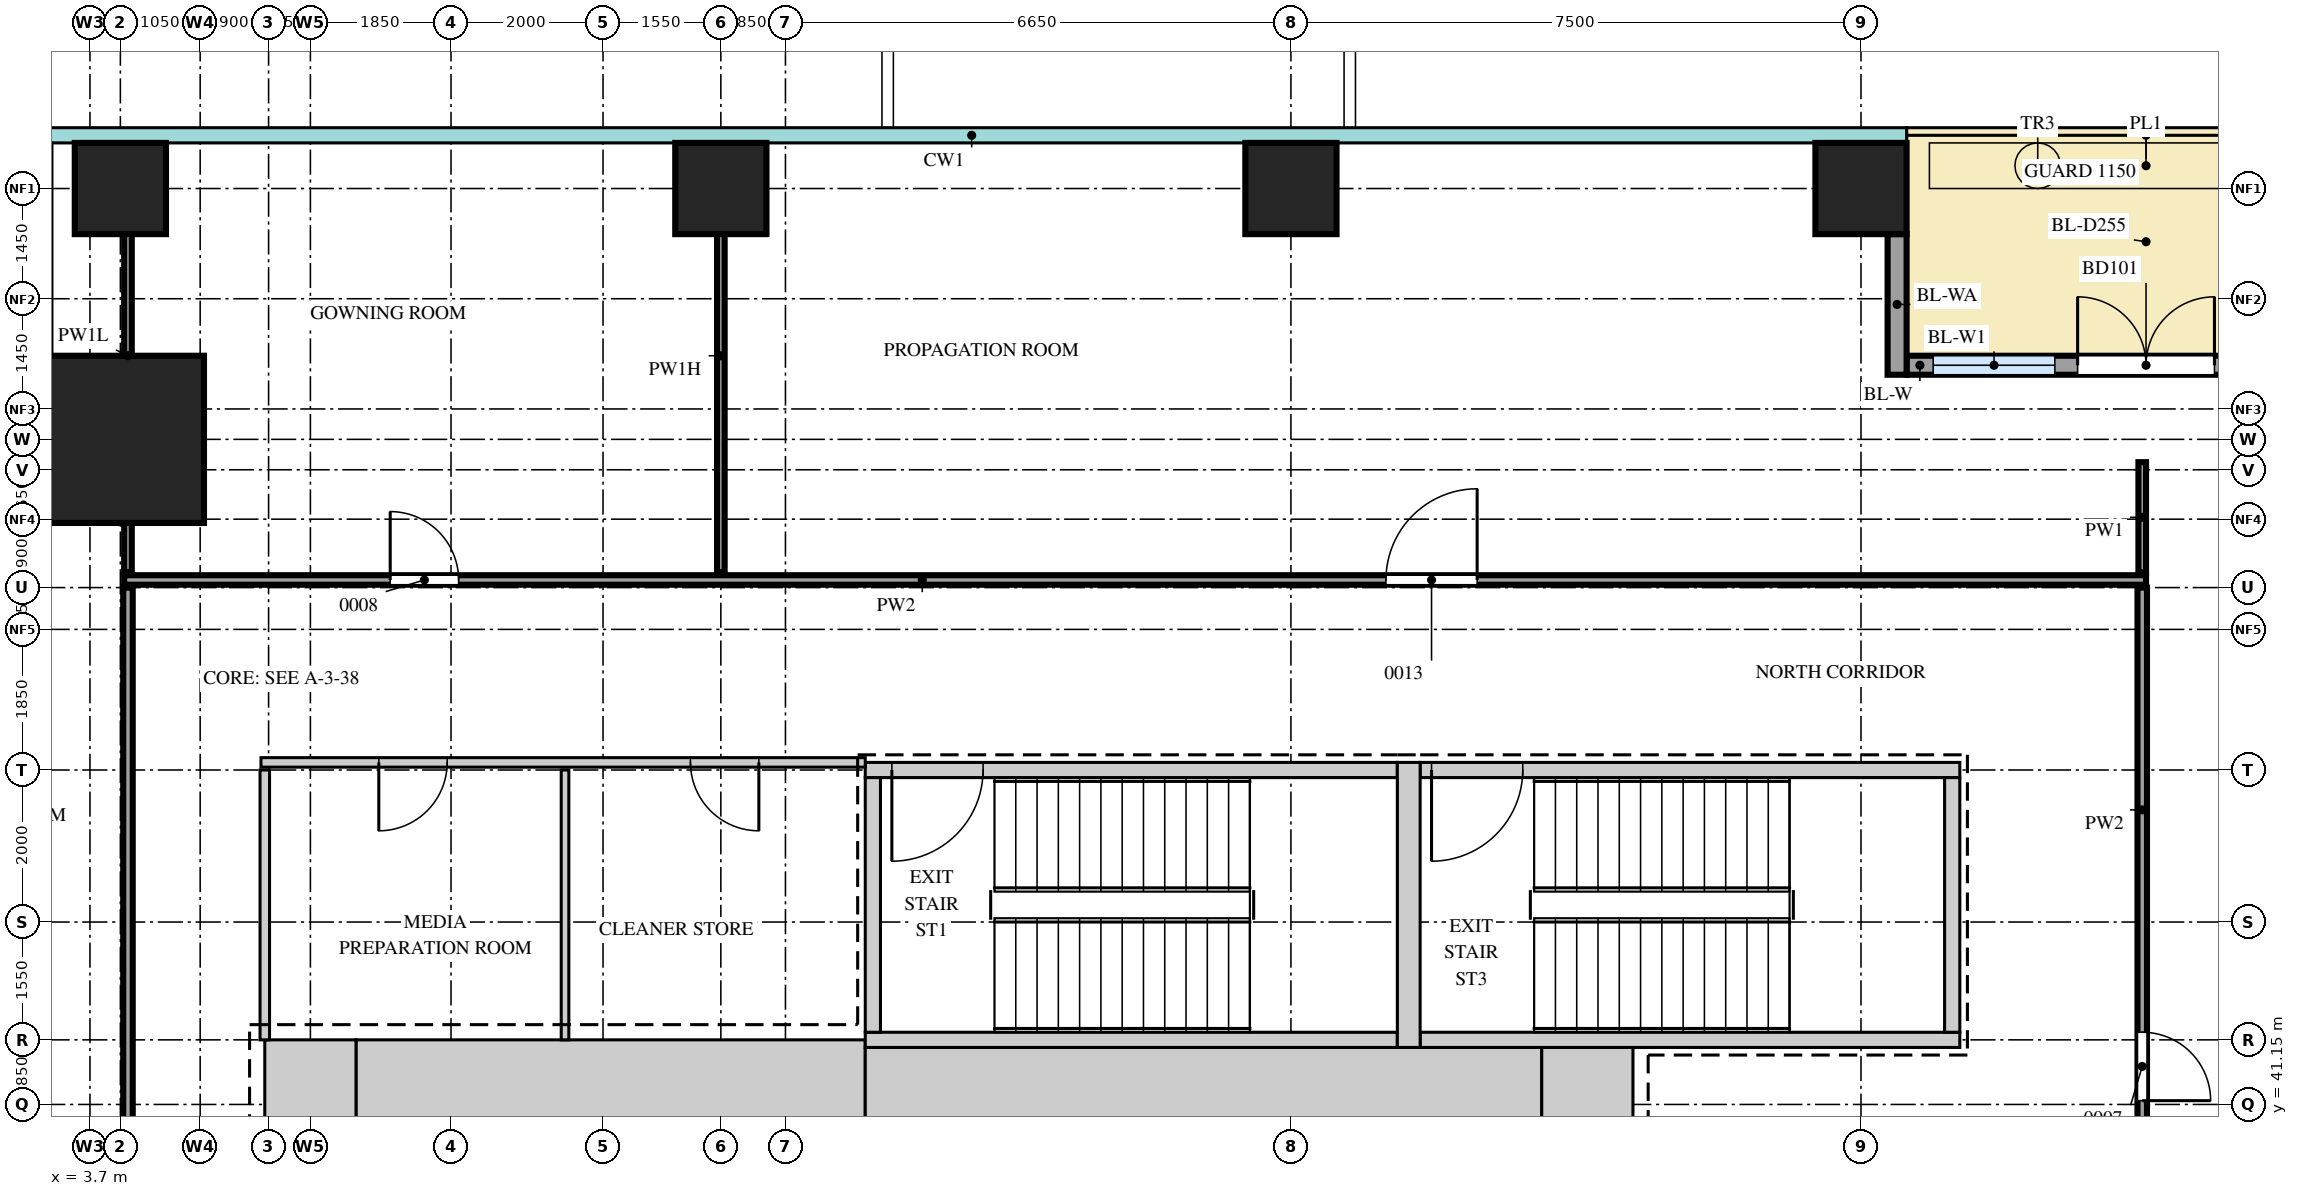
"""IFC4 building model, lengths in metres.
Left out: names, types, materials, properties, quantities, classifications, styles, units other than length and angle.
Written with IfcOpenShell. Run it as: python <this file> out.ifc"""

import sys

from ifc_helpers import new_model, si_unit, direction, frame, frame_2d, origin, origin_2d, place, context, subcontext, project, spatial, rectangle, extrude, source, transform, mapped, element, fill, save


model = new_model("IFC4")
c1 = context("Model", 3, precision=1e-05, world=origin(), true_north=direction((0.0, 1.0)))
c2 = subcontext(c1, "Body", "Model", "MODEL_VIEW")
j1 = project(units=[si_unit("LENGTHUNIT", "METRE"), si_unit("PLANEANGLEUNIT", "RADIAN")], contexts=[c1])
p1 = place(None, origin())
s1 = spatial("IfcSite", under=j1, at=p1, CompositionType="ELEMENT")
p2 = place(p1, origin())
s2 = spatial("IfcBuilding", under=s1, at=p2, CompositionType="ELEMENT")
p3 = place(p2, frame((0.0, 0.0, 51.0)))
s3 = spatial("IfcBuildingStorey", under=s2, at=p3, CompositionType="ELEMENT", Elevation=51.0)
m1 = source(origin(), c2, "Body", "SweptSolid", [
    extrude(rectangle(XDim=6.7, YDim=1.2, at=frame_2d((3.35, 0.0))), origin(), (0.0, 0.0, 1.0), 4.2),
])
p4 = place(p3, frame((7.2, 41.4, 0.0), z_axis=(0.0, 0.0, 1.0), x_axis=(1.0, 0.0, 0.0)))
e1 = element("IfcWall", 1, at=p4, inside=s3, PredefinedType="SHEAR", context=c2, shape_type="MappedRepresentation", body=[
    mapped(m1, transform((0.0, 0.0, 0.0))),
])
m2 = source(origin(), c2, "Body", "SweptSolid", [
    extrude(rectangle(XDim=8.9, YDim=1.1, at=frame_2d((4.45, 0.0))), origin(), (0.0, 0.0, 1.0), 4.2),
])
p5 = place(p3, frame((13.9, 41.35, 0.0), z_axis=(0.0, 0.0, 1.0), x_axis=(1.0, 0.0, 0.0)))
e2 = element("IfcWall", 2, at=p5, inside=s3, PredefinedType="SHEAR", context=c2, shape_type="MappedRepresentation", body=[
    mapped(m2, transform((0.0, 0.0, 0.0))),
])
m3 = source(origin(), c2, "Body", "SweptSolid", [
    extrude(rectangle(XDim=1.2, YDim=1.1, at=frame_2d((0.6, 0.0))), origin(), (0.0, 0.0, 1.0), 4.2),
])
p6 = place(p3, frame((22.8, 41.35, 0.0), z_axis=(0.0, 0.0, 1.0), x_axis=(1.0, 0.0, 0.0)))
e3 = element("IfcWall", 3, at=p6, inside=s3, PredefinedType="SHEAR", context=c2, shape_type="MappedRepresentation", body=[
    mapped(m3, transform((0.0, 0.0, 0.0))),
])
m4 = source(origin(), c2, "Body", "SweptSolid", [
    extrude(rectangle(XDim=1.2, YDim=1.2, at=frame_2d((0.6, 0.0))), origin(), (0.0, 0.0, 1.0), 4.2),
])
p7 = place(p3, frame((6.0, 41.4, 0.0), z_axis=(0.0, 0.0, 1.0), x_axis=(1.0, 0.0, 0.0)))
e4 = element("IfcWall", 4, at=p7, inside=s3, PredefinedType="SHEAR", context=c2, shape_type="MappedRepresentation", body=[
    mapped(m4, transform((0.0, 0.0, 0.0))),
])
m5 = source(origin(), c2, "Body", "SweptSolid", [
    extrude(rectangle(XDim=7.0, YDim=0.2, at=frame_2d((3.5, 0.0))), origin(), (0.0, 0.0, 1.0), 4.2),
])
p8 = place(p3, frame((13.9, 45.55, 0.0), z_axis=(0.0, 0.0, 1.0), x_axis=(1.0, 0.0, 0.0)))
e5 = element("IfcWall", 5, at=p8, inside=s3, PredefinedType="SHEAR", context=c2, shape_type="MappedRepresentation", body=[
    mapped(m5, transform((0.0, 0.0, 0.0))),
])
m6 = source(origin(), c2, "Body", "SweptSolid", [
    extrude(rectangle(XDim=1.2, YDim=2.1, at=frame_2d((0.6, 1.05))), frame((0.0, 0.11, 0.0), z_axis=(0.0, -1.0, 0.0), x_axis=(1.0, 0.0, 0.0)), (0.0, 0.0, 1.0), 0.22),
])
p9 = place(p8, frame((0.35, 0.0, 0.0)))
e6 = element("IfcOpeningElement", 6, at=p9, cuts=e5, PredefinedType="OPENING", context=c2, shape_type="MappedRepresentation", body=[
    mapped(m6, transform((0.0, 0.0, 0.0))),
])
p10 = place(p3, frame((13.9, 42.0, 0.0), z_axis=(0.0, 0.0, 1.0), x_axis=(1.0, 0.0, 0.0)))
e7 = element("IfcWall", 7, at=p10, inside=s3, PredefinedType="SHEAR", context=c2, shape_type="MappedRepresentation", body=[
    mapped(m5, transform((0.0, 0.0, 0.0))),
])
m7 = source(origin(), c2, "Body", "SweptSolid", [
    extrude(rectangle(XDim=7.1, YDim=0.2, at=frame_2d((3.55, 0.0))), origin(), (0.0, 0.0, 1.0), 4.2),
])
p11 = place(p3, frame((21.2, 45.55, 0.0), z_axis=(0.0, 0.0, 1.0), x_axis=(1.0, 0.0, 0.0)))
e8 = element("IfcWall", 8, at=p11, inside=s3, PredefinedType="SHEAR", context=c2, shape_type="MappedRepresentation", body=[
    mapped(m7, transform((0.0, 0.0, 0.0))),
])
p12 = place(p11, frame((0.15, 0.0, 0.0)))
e9 = element("IfcOpeningElement", 9, at=p12, cuts=e8, PredefinedType="OPENING", context=c2, shape_type="MappedRepresentation", body=[
    mapped(m6, transform((0.0, 0.0, 0.0))),
])
p13 = place(p3, frame((21.2, 42.0, 0.0), z_axis=(0.0, 0.0, 1.0), x_axis=(1.0, 0.0, 0.0)))
e10 = element("IfcWall", 10, at=p13, inside=s3, PredefinedType="SHEAR", context=c2, shape_type="MappedRepresentation", body=[
    mapped(m7, transform((0.0, 0.0, 0.0))),
])
m8 = source(origin(), c2, "Body", "SweptSolid", [
    extrude(rectangle(XDim=3.75, YDim=0.3, at=frame_2d((1.875, 0.0))), origin(), (0.0, 0.0, 1.0), 4.2),
])
p14 = place(p3, frame((21.05, 41.9, 0.0), z_axis=(0.0, 0.0, 1.0), x_axis=(0.0, 1.0, 0.0)))
e11 = element("IfcWall", 11, at=p14, inside=s3, PredefinedType="SHEAR", context=c2, shape_type="MappedRepresentation", body=[
    mapped(m8, transform((0.0, 0.0, 0.0))),
])
m9 = source(origin(), c2, "Body", "SweptSolid", [
    extrude(rectangle(XDim=3.35, YDim=0.2, at=frame_2d((1.675, 0.0))), origin(), (0.0, 0.0, 1.0), 4.2),
])
for number, where, z_axis, x_axis in (
    (12, (14.0, 42.1, 0.0), (0.0, 0.0, 1.0), (0.0, 1.0, 0.0)),
    (13, (28.2, 42.1, 0.0), (0.0, 0.0, 1.0), (0.0, 1.0, 0.0)),
):
    element("IfcWall", number, at=place(p3, frame(where, z_axis=z_axis, x_axis=x_axis)), inside=s3, PredefinedType="SHEAR", context=c2, shape_type="MappedRepresentation", body=[
        mapped(m9, transform((0.0, 0.0, 0.0))),
    ])
m10 = source(origin(), c2, "Body", "SweptSolid", [
    extrude(rectangle(XDim=2.2, YDim=2.2, at=origin_2d()), origin(), (0.0, 0.0, 1.0), 4.5),
])
p15 = place(p3, frame((4.1, 49.9, 0.0), z_axis=(0.0, 0.0, 1.0), x_axis=(1.0, 0.0, 0.0)))
e14 = element("IfcColumn", 14, at=p15, inside=s3, PredefinedType="COLUMN", context=c2, shape_type="MappedRepresentation", body=[
    mapped(m10, transform((0.0, 0.0, 0.0))),
])
m11 = source(origin(), c2, "Body", "SweptSolid", [
    extrude(rectangle(XDim=1.2, YDim=1.2, at=origin_2d()), origin(), (0.0, 0.0, 1.0), 4.2),
])
for number, where, z_axis, x_axis in (
    (15, (4.1, 53.2, 0.0), (0.0, 0.0, 1.0), (1.0, 0.0, 0.0)),
    (16, (12.0, 53.2, 0.0), (0.0, 0.0, 1.0), (1.0, 0.0, 0.0)),
    (17, (19.5, 53.2, 0.0), (0.0, 0.0, 1.0), (1.0, 0.0, 0.0)),
    (18, (27.0, 53.2, 0.0), (0.0, 0.0, 1.0), (1.0, 0.0, 0.0)),
):
    element("IfcColumn", number, at=place(p3, frame(where, z_axis=z_axis, x_axis=x_axis)), inside=s3, PredefinedType="COLUMN", context=c2, shape_type="MappedRepresentation", body=[
        mapped(m11, transform((0.0, 0.0, 0.0))),
    ])
m12 = source(origin(), c2, "Body", "SweptSolid", [
    extrude(rectangle(XDim=6.3, YDim=0.25, at=frame_2d((3.15, 0.0))), origin(), (0.0, 0.0, 1.0), 4.2),
])
p16 = place(p3, frame((27.6, 50.875, 0.0), z_axis=(0.0, 0.0, 1.0), x_axis=(1.0, 0.0, 0.0)))
e19 = element("IfcWall", 19, at=p16, inside=s3, PredefinedType="SOLIDWALL", context=c2, shape_type="MappedRepresentation", body=[
    mapped(m12, transform((0.0, 0.0, 0.0))),
])
m13 = source(origin(), c2, "Body", "SweptSolid", [
    extrude(rectangle(XDim=1.6, YDim=2.4, at=frame_2d((0.8, 1.2))), frame((0.0, 0.135, 0.0), z_axis=(0.0, -1.0, 0.0), x_axis=(1.0, 0.0, 0.0)), (0.0, 0.0, 1.0), 0.27),
])
p17 = place(p16, frame((0.35, 0.0, 0.0)))
e20 = element("IfcOpeningElement", 20, at=p17, cuts=e19, PredefinedType="OPENING", context=c2, shape_type="MappedRepresentation", body=[
    mapped(m13, transform((0.0, 0.0, 0.0))),
])
p18 = place(p16, frame((4.35, 0.0, 0.0)))
e21 = element("IfcOpeningElement", 21, at=p18, cuts=e19, PredefinedType="OPENING", context=c2, shape_type="MappedRepresentation", body=[
    mapped(m13, transform((0.0, 0.0, 0.0))),
])
m14 = source(origin(), c2, "Body", "SweptSolid", [
    extrude(rectangle(XDim=1.8, YDim=2.4, at=frame_2d((0.9, 1.2))), frame((0.0, 0.135, 0.0), z_axis=(0.0, -1.0, 0.0), x_axis=(1.0, 0.0, 0.0)), (0.0, 0.0, 1.0), 0.27),
])
p19 = place(p16, frame((2.25, 0.0, 0.0)))
e22 = element("IfcOpeningElement", 22, at=p19, cuts=e19, PredefinedType="OPENING", context=c2, shape_type="MappedRepresentation", body=[
    mapped(m14, transform((0.0, 0.0, 0.0))),
])
m15 = source(origin(), c2, "Body", "SweptSolid", [
    extrude(rectangle(XDim=1.85, YDim=0.25, at=frame_2d((0.925, 0.0))), origin(), (0.0, 0.0, 1.0), 3.9),
])
p20 = place(p3, frame((27.475, 52.6, 0.0), z_axis=(0.0, 0.0, 1.0), x_axis=(0.0, -1.0, 0.0)))
e23 = element("IfcWall", 23, at=p20, inside=s3, PredefinedType="SOLIDWALL", context=c2, shape_type="MappedRepresentation", body=[
    mapped(m15, transform((0.0, 0.0, 0.0))),
])
m16 = source(origin(), c2, "Body", "SweptSolid", [
    extrude(rectangle(XDim=10.15, YDim=0.125, at=frame_2d((5.075, 0.0))), origin(), (0.0, 0.0, 1.0), 4.3),
])
p21 = place(p3, frame((30.7, 37.8, 0.0), z_axis=(0.0, 0.0, 1.0), x_axis=(0.0, 1.0, 0.0)))
e24 = element("IfcWall", 24, at=p21, inside=s3, PredefinedType="PARTITIONING", context=c2, shape_type="MappedRepresentation", body=[
    mapped(m16, transform((0.0, 0.0, 0.0))),
])
m17 = source(origin(), c2, "Body", "SweptSolid", [
    extrude(rectangle(XDim=0.9, YDim=2.1, at=frame_2d((0.45, 1.05))), frame((0.0, 0.073, 0.0), z_axis=(0.0, -1.0, 0.0), x_axis=(1.0, 0.0, 0.0)), (0.0, 0.0, 1.0), 0.145),
])
p22 = place(p21, frame((3.4, 0.0, 0.0)))
e25 = element("IfcOpeningElement", 25, at=p22, cuts=e24, PredefinedType="OPENING", context=c2, shape_type="MappedRepresentation", body=[
    mapped(m17, transform((0.0, 0.0, 0.0))),
])
m18 = source(origin(), c2, "Body", "SweptSolid", [
    extrude(rectangle(XDim=3.55, YDim=0.125, at=frame_2d((1.775, 0.0))), origin(), (0.0, 0.0, 1.0), 4.3),
])
p23 = place(p3, frame((6.0, 42.0, 0.0), z_axis=(0.0, 0.0, 1.0), x_axis=(0.0, 1.0, 0.0)))
e26 = element("IfcWall", 26, at=p23, inside=s3, PredefinedType="PARTITIONING", context=c2, shape_type="MappedRepresentation", body=[
    mapped(m18, transform((0.0, 0.0, 0.0))),
])
m19 = source(origin(), c2, "Body", "SweptSolid", [
    extrude(rectangle(XDim=3.55, YDim=0.1, at=frame_2d((1.775, 0.0))), origin(), (0.0, 0.0, 1.0), 4.3),
])
p24 = place(p3, frame((9.95, 42.0, 0.0), z_axis=(0.0, 0.0, 1.0), x_axis=(0.0, 1.0, 0.0)))
e27 = element("IfcWall", 27, at=p24, inside=s3, PredefinedType="PARTITIONING", context=c2, shape_type="MappedRepresentation", body=[
    mapped(m19, transform((0.0, 0.0, 0.0))),
])
m20 = source(origin(), c2, "Body", "SweptSolid", [
    extrude(rectangle(XDim=7.95, YDim=0.125, at=frame_2d((3.975, 0.0))), origin(), (0.0, 0.0, 1.0), 4.3),
])
p25 = place(p3, frame((5.95, 45.65, 0.0), z_axis=(0.0, 0.0, 1.0), x_axis=(1.0, 0.0, 0.0)))
e28 = element("IfcWall", 28, at=p25, inside=s3, PredefinedType="PARTITIONING", context=c2, shape_type="MappedRepresentation", body=[
    mapped(m20, transform((0.0, 0.0, 0.0))),
])
p26 = place(p25, frame((1.55, 0.0, 0.0)))
e29 = element("IfcOpeningElement", 29, at=p26, cuts=e28, PredefinedType="OPENING", context=c2, shape_type="MappedRepresentation", body=[
    mapped(m17, transform((0.0, 0.0, 0.0))),
])
p27 = place(p25, frame((5.65, 0.0, 0.0)))
e30 = element("IfcOpeningElement", 30, at=p27, cuts=e28, PredefinedType="OPENING", context=c2, shape_type="MappedRepresentation", body=[
    mapped(m17, transform((0.0, 0.0, 0.0))),
])
m21 = source(origin(), c2, "Body", "SweptSolid", [
    extrude(rectangle(XDim=26.6, YDim=0.125, at=frame_2d((13.3, 0.0))), origin(), (0.0, 0.0, 1.0), 4.3),
])
p28 = place(p3, frame((4.15, 48.05, 0.0), z_axis=(0.0, 0.0, 1.0), x_axis=(1.0, 0.0, 0.0)))
e31 = element("IfcWall", 31, at=p28, inside=s3, PredefinedType="PARTITIONING", context=c2, shape_type="MappedRepresentation", body=[
    mapped(m21, transform((0.0, 0.0, 0.0))),
])
p29 = place(p28, frame((3.5, 0.0, 0.0)))
e32 = element("IfcOpeningElement", 32, at=p29, cuts=e31, PredefinedType="OPENING", context=c2, shape_type="MappedRepresentation", body=[
    mapped(m17, transform((0.0, 0.0, 0.0))),
])
m22 = source(origin(), c2, "Body", "SweptSolid", [
    extrude(rectangle(XDim=1.2, YDim=2.1, at=frame_2d((0.6, 1.05))), frame((0.0, 0.073, 0.0), z_axis=(0.0, -1.0, 0.0), x_axis=(1.0, 0.0, 0.0)), (0.0, 0.0, 1.0), 0.145),
])
p30 = place(p28, frame((16.6, 0.0, 0.0)))
e33 = element("IfcOpeningElement", 33, at=p30, cuts=e31, PredefinedType="OPENING", context=c2, shape_type="MappedRepresentation", body=[
    mapped(m22, transform((0.0, 0.0, 0.0))),
])
m23 = source(origin(), c2, "Body", "SweptSolid", [
    extrude(rectangle(XDim=5.7, YDim=0.1, at=frame_2d((2.85, 0.0))), origin(), (0.0, 0.0, 1.0), 3.6),
])
p31 = place(p3, frame((4.2, 48.15, 0.0), z_axis=(0.0, 0.0, 1.0), x_axis=(0.0, 1.0, 0.0)))
e34 = element("IfcWall", 34, at=p31, inside=s3, PredefinedType="PARTITIONING", context=c2, shape_type="MappedRepresentation", body=[
    mapped(m23, transform((0.0, 0.0, 0.0))),
])
m24 = source(origin(), c2, "Body", "SweptSolid", [
    extrude(rectangle(XDim=5.7, YDim=0.1, at=frame_2d((2.85, 0.0))), origin(), (0.0, 0.0, 1.0), 3.7),
])
p32 = place(p3, frame((12.0, 48.15, 0.0), z_axis=(0.0, 0.0, 1.0), x_axis=(0.0, 1.0, 0.0)))
e35 = element("IfcWall", 35, at=p32, inside=s3, PredefinedType="PARTITIONING", context=c2, shape_type="MappedRepresentation", body=[
    mapped(m24, transform((0.0, 0.0, 0.0))),
])
m25 = source(origin(), c2, "Body", "SweptSolid", [
    extrude(rectangle(XDim=1.45, YDim=0.1, at=frame_2d((0.725, 0.0))), origin(), (0.0, 0.0, 1.0), 4.3),
])
p33 = place(p3, frame((30.7, 48.15, 0.0), z_axis=(0.0, 0.0, 1.0), x_axis=(0.0, 1.0, 0.0)))
e36 = element("IfcWall", 36, at=p33, inside=s3, PredefinedType="PARTITIONING", context=c2, shape_type="MappedRepresentation", body=[
    mapped(m25, transform((0.0, 0.0, 0.0))),
])
m26 = source(origin(), c2, "Body", "SweptSolid", [
    extrude(rectangle(XDim=31.2, YDim=0.125, at=frame_2d((15.6, 0.0))), origin(), (0.0, 0.0, 1.0), 4.3),
])
p34 = place(p3, frame((4.2, 16.75, 0.0), z_axis=(0.0, 0.0, 1.0), x_axis=(0.0, 1.0, 0.0)))
e37 = element("IfcWall", 37, at=p34, inside=s3, PredefinedType="PARTITIONING", context=c2, shape_type="MappedRepresentation", body=[
    mapped(m26, transform((0.0, 0.0, 0.0))),
])
p35 = place(p34, frame((5.15, 0.0, 0.0)))
e38 = element("IfcOpeningElement", 38, at=p35, cuts=e37, PredefinedType="OPENING", context=c2, shape_type="MappedRepresentation", body=[
    mapped(m17, transform((0.0, 0.0, 0.0))),
])
p36 = place(p34, frame((20.45, 0.0, 0.0)))
e39 = element("IfcOpeningElement", 39, at=p36, cuts=e37, PredefinedType="OPENING", context=c2, shape_type="MappedRepresentation", body=[
    mapped(m22, transform((0.0, 0.0, 0.0))),
])
m27 = source(origin(), c2, "Body", "SweptSolid", [
    extrude(rectangle(XDim=1.6, YDim=2.4, at=frame_2d((0.8, 1.2))), frame((0.0, 0.03, 0.0), z_axis=(0.0, -1.0, 0.0), x_axis=(1.0, 0.0, 0.0)), (0.0, 0.0, 1.0), 0.06),
])
p37 = place(p17, origin())
e40 = element("IfcWindow", 40, at=p37, inside=s3, PartitioningType="SINGLE_PANEL", PredefinedType="WINDOW", context=c2, shape_type="MappedRepresentation", body=[
    mapped(m27, transform((0.0, 0.0, 0.0))),
])
fill(e20, e40)
m28 = source(origin(), c2, "Body", "SweptSolid", [
    extrude(rectangle(XDim=1.8, YDim=2.4, at=frame_2d((0.9, 1.2))), frame((0.0, 0.025, 0.0), z_axis=(0.0, -1.0, 0.0), x_axis=(1.0, 0.0, 0.0)), (0.0, 0.0, 1.0), 0.05),
])
p38 = place(p19, origin())
e41 = element("IfcDoor", 41, at=p38, inside=s3, OperationType="DOUBLE_DOOR_DOUBLE_SWING", PredefinedType="DOOR", context=c2, shape_type="MappedRepresentation", body=[
    mapped(m28, transform((0.0, 0.0, 0.0))),
])
fill(e22, e41)
m29 = source(origin(), c2, "Body", "SweptSolid", [
    extrude(rectangle(XDim=0.9, YDim=2.1, at=frame_2d((0.45, 1.05))), frame((0.0, 0.025, 0.0), z_axis=(0.0, -1.0, 0.0), x_axis=(1.0, 0.0, 0.0)), (0.0, 0.0, 1.0), 0.05),
])
p39 = place(p22, origin())
e42 = element("IfcDoor", 42, at=p39, inside=s3, OperationType="SINGLE_SWING_LEFT", PredefinedType="DOOR", context=c2, shape_type="MappedRepresentation", body=[
    mapped(m29, transform((0.0, 0.0, 0.0))),
])
fill(e25, e42)
p40 = place(p29, origin())
e43 = element("IfcDoor", 43, at=p40, inside=s3, OperationType="SINGLE_SWING_RIGHT", PredefinedType="DOOR", context=c2, shape_type="MappedRepresentation", body=[
    mapped(m29, transform((0.0, 0.0, 0.0))),
])
fill(e32, e43)
m30 = source(origin(), c2, "Body", "SweptSolid", [
    extrude(rectangle(XDim=1.2, YDim=2.1, at=frame_2d((0.6, 1.05))), frame((0.0, 0.025, 0.0), z_axis=(0.0, -1.0, 0.0), x_axis=(1.0, 0.0, 0.0)), (0.0, 0.0, 1.0), 0.05),
])
p41 = place(p30, origin())
e44 = element("IfcDoor", 44, at=p41, inside=s3, OperationType="SINGLE_SWING_LEFT", PredefinedType="DOOR", context=c2, shape_type="MappedRepresentation", body=[
    mapped(m30, transform((0.0, 0.0, 0.0))),
])
fill(e33, e44)
p42 = place(p26, origin())
e45 = element("IfcDoor", 45, at=p42, inside=s3, OperationType="SINGLE_SWING_LEFT", PredefinedType="DOOR", context=c2, shape_type="MappedRepresentation", body=[
    mapped(m29, transform((0.0, 0.0, 0.0))),
])
fill(e29, e45)
p43 = place(p27, origin())
e46 = element("IfcDoor", 46, at=p43, inside=s3, OperationType="SINGLE_SWING_RIGHT", PredefinedType="DOOR", context=c2, shape_type="MappedRepresentation", body=[
    mapped(m29, transform((0.0, 0.0, 0.0))),
])
fill(e30, e46)
p44 = place(p9, origin())
e47 = element("IfcDoor", 47, at=p44, inside=s3, OperationType="SINGLE_SWING_LEFT", PredefinedType="DOOR", context=c2, shape_type="MappedRepresentation", body=[
    mapped(m30, transform((0.0, 0.0, 0.0))),
])
fill(e6, e47)
p45 = place(p12, origin())
e48 = element("IfcDoor", 48, at=p45, inside=s3, OperationType="SINGLE_SWING_LEFT", PredefinedType="DOOR", context=c2, shape_type="MappedRepresentation", body=[
    mapped(m30, transform((0.0, 0.0, 0.0))),
])
fill(e9, e48)
save(model, sys.argv[1])
